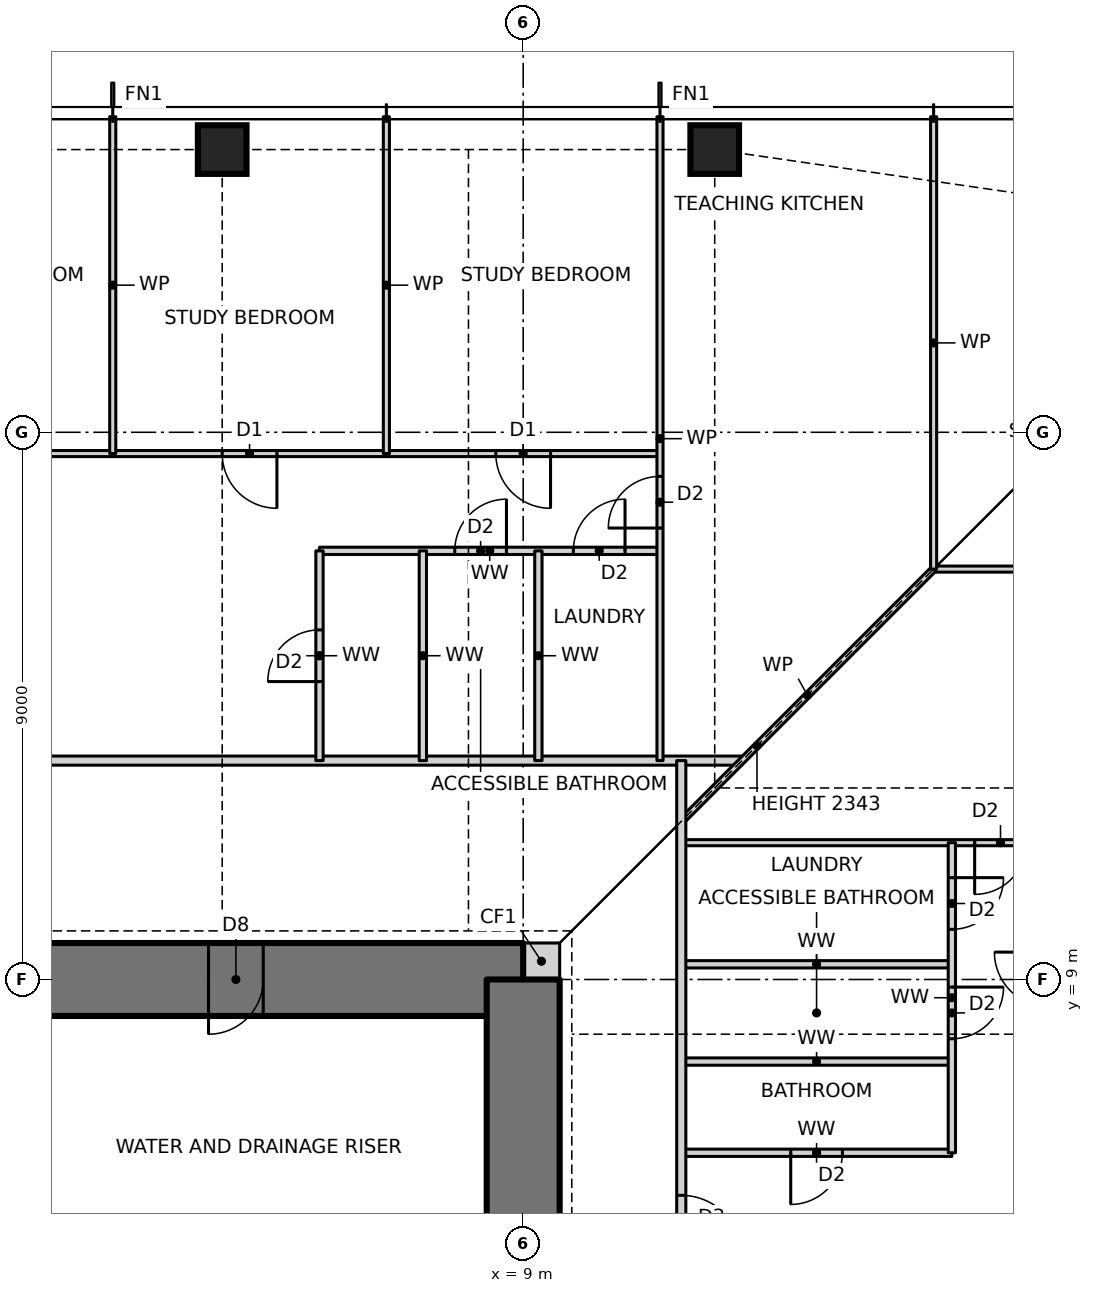
"""IFC4 building model, lengths in metres.
Left out: names, types, materials, properties, quantities, classifications, styles, units other than length and angle.
Written with IfcOpenShell. Run it as: python <this file> out.ifc"""

import sys

from ifc_helpers import new_model, si_unit, direction, frame, frame_2d, origin, origin_2d, place, context, subcontext, project, spatial, rectangle, hollow_rectangle, extrude, element, fill, save


model = new_model("IFC4")
c1 = context("Model", 3, precision=1e-05, world=origin(), true_north=direction((0.0, 1.0)))
c2 = subcontext(c1, "Body", "Model", "MODEL_VIEW")
j1 = project(units=[si_unit("LENGTHUNIT", "METRE"), si_unit("PLANEANGLEUNIT", "RADIAN")], contexts=[c1])
p1 = place(None, origin())
s1 = spatial("IfcSite", under=j1, at=p1, CompositionType="ELEMENT")
p2 = place(p1, origin())
s2 = spatial("IfcBuilding", under=s1, at=p2, CompositionType="ELEMENT")
p3 = place(p2, frame((0.0, 0.0, 60.5)))
s3 = spatial("IfcBuildingStorey", under=s2, at=p3, CompositionType="ELEMENT", Elevation=60.5)
for number, where, z_axis, x_axis in (
    (1, (12.15, 22.65, 0.0), (0.0, 0.0, 1.0), (1.0, 0.0, 0.0)),
    (2, (4.05, 22.65, 0.0), (0.0, 0.0, 1.0), (1.0, 0.0, 0.0)),
):
    element("IfcColumn", number, at=place(p3, frame(where, z_axis=z_axis, x_axis=x_axis)), inside=s3, PredefinedType="COLUMN", context=c2, shape_type="SweptSolid", body=[
        extrude(hollow_rectangle(XDim=0.8, YDim=0.8, WallThickness=0.09, at=origin_2d()), origin(), (0.0, 0.0, 1.0), 3.5),
    ])
p4 = place(p3, frame((9.0, 9.3, 0.0), z_axis=(0.0, 0.0, 1.0), x_axis=(1.0, 0.0, 0.0)))
e3 = element("IfcWall", 3, at=p4, inside=s3, PredefinedType="SOLIDWALL", context=c2, shape_type="SweptSolid", body=[
    extrude(rectangle(XDim=0.6, YDim=0.6, at=frame_2d((0.3, 0.0))), origin(), (0.0, 0.0, 1.0), 3.5),
])
p5 = place(p3, frame((9.0, 9.0, 0.0), z_axis=(0.0, 0.0, 1.0), x_axis=(-1.0, 0.0, 0.0)))
e4 = element("IfcWall", 4, at=p5, inside=s3, PredefinedType="SHEAR", context=c2, shape_type="SweptSolid", body=[
    extrude(rectangle(XDim=18.0, YDim=1.2, at=frame_2d((9.0, 0.0))), origin(), (0.0, 0.0, 1.0), 3.5),
])
p6 = place(p5, frame((11.125, 0.0, 0.0)))
e5 = element("IfcOpeningElement", 5, at=p6, cuts=e4, PredefinedType="OPENING", context=c2, shape_type="SweptSolid", body=[
    extrude(rectangle(XDim=0.9, YDim=2.1, at=frame_2d((0.45, 1.05))), frame((0.0, 0.61, 0.0), z_axis=(0.0, -1.0, 0.0), x_axis=(1.0, 0.0, 0.0)), (0.0, 0.0, 1.0), 1.22),
])
p7 = place(p5, frame((4.275, 0.0, 0.0)))
e6 = element("IfcOpeningElement", 6, at=p7, cuts=e4, PredefinedType="OPENING", context=c2, shape_type="SweptSolid", body=[
    extrude(rectangle(XDim=0.9, YDim=2.1, at=frame_2d((0.45, 1.05))), frame((0.0, 0.61, 0.0), z_axis=(0.0, -1.0, 0.0), x_axis=(1.0, 0.0, 0.0)), (0.0, 0.0, 1.0), 1.22),
])
p8 = place(p3, frame((9.0, -9.0, 0.0), z_axis=(0.0, 0.0, 1.0), x_axis=(0.0, 1.0, 0.0)))
e7 = element("IfcWall", 7, at=p8, inside=s3, PredefinedType="SHEAR", context=c2, shape_type="SweptSolid", body=[
    extrude(rectangle(XDim=18.0, YDim=1.2, at=frame_2d((9.0, 0.0))), origin(), (0.0, 0.0, 1.0), 3.5),
])
p9 = place(p8, frame((8.5, 0.0, 0.0)))
e8 = element("IfcOpeningElement", 8, at=p9, cuts=e7, PredefinedType="OPENING", context=c2, shape_type="SweptSolid", body=[
    extrude(rectangle(XDim=1.0, YDim=2.1, at=frame_2d((0.5, 1.05))), frame((0.0, 0.61, 0.0), z_axis=(0.0, -1.0, 0.0), x_axis=(1.0, 0.0, 0.0)), (0.0, 0.0, 1.0), 1.22),
])
p10 = place(p3, frame((11.6, 6.15, 0.0), z_axis=(0.0, 0.0, 1.0), x_axis=(1.0, 0.0, 0.0)))
e9 = element("IfcWall", 9, at=p10, inside=s3, PredefinedType="PARTITIONING", context=c2, shape_type="SweptSolid", body=[
    extrude(rectangle(XDim=4.45, YDim=0.12, at=frame_2d((2.225, 0.0))), origin(), (0.0, 0.0, 1.0), 3.27),
])
p11 = place(p10, frame((1.8, 0.0, 0.0)))
e10 = element("IfcOpeningElement", 10, at=p11, cuts=e9, PredefinedType="OPENING", context=c2, shape_type="SweptSolid", body=[
    extrude(rectangle(XDim=0.85, YDim=2.1, at=frame_2d((0.425, 1.05))), frame((0.0, 0.07, 0.0), z_axis=(0.0, -1.0, 0.0), x_axis=(1.0, 0.0, 0.0)), (0.0, 0.0, 1.0), 0.14),
])
for number, where, z_axis, x_axis in (
    (11, (11.6, 7.65, 0.0), (0.0, 0.0, 1.0), (1.0, 0.0, 0.0)),
    (12, (11.6, 9.25, 0.0), (0.0, 0.0, 1.0), (1.0, 0.0, 0.0)),
):
    element("IfcWall", number, at=place(p3, frame(where, z_axis=z_axis, x_axis=x_axis)), inside=s3, PredefinedType="PARTITIONING", context=c2, shape_type="SweptSolid", body=[
        extrude(rectangle(XDim=4.45, YDim=0.12, at=frame_2d((2.225, 0.0))), origin(), (0.0, 0.0, 1.0), 3.27),
    ])
p12 = place(p3, frame((11.6, 11.25, 0.0), z_axis=(0.0, 0.0, 1.0), x_axis=(1.0, 0.0, 0.0)))
e13 = element("IfcWall", 13, at=p12, inside=s3, PredefinedType="PARTITIONING", context=c2, shape_type="SweptSolid", body=[
    extrude(rectangle(XDim=11.59, YDim=0.1, at=frame_2d((5.795, 0.0))), origin(), (0.0, 0.0, 1.0), 3.27),
])
p13 = place(p12, frame((4.825, 0.0, 0.0)))
e14 = element("IfcOpeningElement", 14, at=p13, cuts=e13, PredefinedType="OPENING", context=c2, shape_type="SweptSolid", body=[
    extrude(rectangle(XDim=0.85, YDim=2.1, at=frame_2d((0.425, 1.05))), frame((0.0, 0.06, 0.0), z_axis=(0.0, -1.0, 0.0), x_axis=(1.0, 0.0, 0.0)), (0.0, 0.0, 1.0), 0.12),
])
p14 = place(p3, frame((-12.6, 12.6, 0.0), z_axis=(0.0, 0.0, 1.0), x_axis=(1.0, 0.0, 0.0)))
e15 = element("IfcWall", 15, at=p14, inside=s3, PredefinedType="PARTITIONING", context=c2, shape_type="SweptSolid", body=[
    extrude(rectangle(XDim=25.2, YDim=0.15, at=frame_2d((12.6, 0.0))), origin(), (0.0, 0.0, 1.0), 3.27),
])
p15 = place(p14, frame((11.505, 0.0, 0.0)))
e16 = element("IfcOpeningElement", 16, at=p15, cuts=e15, PredefinedType="OPENING", context=c2, shape_type="SweptSolid", body=[
    extrude(rectangle(XDim=1.0, YDim=2.1, at=frame_2d((0.5, 1.05))), frame((0.0, 0.085, 0.0), z_axis=(0.0, -1.0, 0.0), x_axis=(1.0, 0.0, 0.0)), (0.0, 0.0, 1.0), 0.17),
])
p16 = place(p3, frame((15.75, 15.75, 0.0), z_axis=(0.0, 0.0, 1.0), x_axis=(1.0, 0.0, 0.0)))
e17 = element("IfcWall", 17, at=p16, inside=s3, PredefinedType="PARTITIONING", context=c2, shape_type="SweptSolid", body=[
    extrude(rectangle(XDim=7.44, YDim=0.1, at=frame_2d((3.72, 0.0))), origin(), (0.0, 0.0, 1.0), 3.27),
])
p17 = place(p16, frame((3.295, 0.0, 0.0)))
e18 = element("IfcOpeningElement", 18, at=p17, cuts=e17, PredefinedType="OPENING", context=c2, shape_type="SweptSolid", body=[
    extrude(rectangle(XDim=0.85, YDim=2.1, at=frame_2d((0.425, 1.05))), frame((0.0, 0.06, 0.0), z_axis=(0.0, -1.0, 0.0), x_axis=(1.0, 0.0, 0.0)), (0.0, 0.0, 1.0), 0.12),
])
p18 = place(p3, frame((5.65, 16.05, 0.0), z_axis=(0.0, 0.0, 1.0), x_axis=(1.0, 0.0, 0.0)))
e19 = element("IfcWall", 19, at=p18, inside=s3, PredefinedType="PARTITIONING", context=c2, shape_type="SweptSolid", body=[
    extrude(rectangle(XDim=5.6, YDim=0.12, at=frame_2d((2.8, 0.0))), origin(), (0.0, 0.0, 1.0), 3.27),
])
p19 = place(p18, frame((4.175, 0.0, 0.0)))
e20 = element("IfcOpeningElement", 20, at=p19, cuts=e19, PredefinedType="OPENING", context=c2, shape_type="SweptSolid", body=[
    extrude(rectangle(XDim=0.85, YDim=2.1, at=frame_2d((0.425, 1.05))), frame((0.0, 0.07, 0.0), z_axis=(0.0, -1.0, 0.0), x_axis=(1.0, 0.0, 0.0)), (0.0, 0.0, 1.0), 0.14),
])
p20 = place(p18, frame((2.225, 0.0, 0.0)))
e21 = element("IfcOpeningElement", 21, at=p20, cuts=e19, PredefinedType="OPENING", context=c2, shape_type="SweptSolid", body=[
    extrude(rectangle(XDim=0.85, YDim=2.1, at=frame_2d((0.425, 1.05))), frame((0.0, 0.07, 0.0), z_axis=(0.0, -1.0, 0.0), x_axis=(1.0, 0.0, 0.0)), (0.0, 0.0, 1.0), 0.14),
])
p21 = place(p3, frame((-15.75, 17.65, 0.0), z_axis=(0.0, 0.0, 1.0), x_axis=(1.0, 0.0, 0.0)))
e22 = element("IfcWall", 22, at=p21, inside=s3, PredefinedType="PARTITIONING", context=c2, shape_type="SweptSolid", body=[
    extrude(rectangle(XDim=27.0, YDim=0.1, at=frame_2d((13.5, 0.0))), origin(), (0.0, 0.0, 1.0), 3.27),
])
p22 = place(p21, frame((24.3, 0.0, 0.0)))
e23 = element("IfcOpeningElement", 23, at=p22, cuts=e22, PredefinedType="OPENING", context=c2, shape_type="SweptSolid", body=[
    extrude(rectangle(XDim=0.9, YDim=2.1, at=frame_2d((0.45, 1.05))), frame((0.0, 0.06, 0.0), z_axis=(0.0, -1.0, 0.0), x_axis=(1.0, 0.0, 0.0)), (0.0, 0.0, 1.0), 0.12),
])
p23 = place(p21, frame((19.8, 0.0, 0.0)))
e24 = element("IfcOpeningElement", 24, at=p23, cuts=e22, PredefinedType="OPENING", context=c2, shape_type="SweptSolid", body=[
    extrude(rectangle(XDim=0.9, YDim=2.1, at=frame_2d((0.45, 1.05))), frame((0.0, 0.06, 0.0), z_axis=(0.0, -1.0, 0.0), x_axis=(1.0, 0.0, 0.0)), (0.0, 0.0, 1.0), 0.12),
])
p24 = place(p21, frame((15.3, 0.0, 0.0)))
e25 = element("IfcOpeningElement", 25, at=p24, cuts=e22, PredefinedType="OPENING", context=c2, shape_type="SweptSolid", body=[
    extrude(rectangle(XDim=0.9, YDim=2.1, at=frame_2d((0.45, 1.05))), frame((0.0, 0.06, 0.0), z_axis=(0.0, -1.0, 0.0), x_axis=(1.0, 0.0, 0.0)), (0.0, 0.0, 1.0), 0.12),
])
p25 = place(p21, frame((10.8, 0.0, 0.0)))
e26 = element("IfcOpeningElement", 26, at=p25, cuts=e22, PredefinedType="OPENING", context=c2, shape_type="SweptSolid", body=[
    extrude(rectangle(XDim=0.9, YDim=2.1, at=frame_2d((0.45, 1.05))), frame((0.0, 0.06, 0.0), z_axis=(0.0, -1.0, 0.0), x_axis=(1.0, 0.0, 0.0)), (0.0, 0.0, 1.0), 0.12),
])
p26 = place(p21, frame((6.3, 0.0, 0.0)))
e27 = element("IfcOpeningElement", 27, at=p26, cuts=e22, PredefinedType="OPENING", context=c2, shape_type="SweptSolid", body=[
    extrude(rectangle(XDim=0.9, YDim=2.1, at=frame_2d((0.45, 1.05))), frame((0.0, 0.06, 0.0), z_axis=(0.0, -1.0, 0.0), x_axis=(1.0, 0.0, 0.0)), (0.0, 0.0, 1.0), 0.12),
])
p27 = place(p21, frame((1.8, 0.0, 0.0)))
e28 = element("IfcOpeningElement", 28, at=p27, cuts=e22, PredefinedType="OPENING", context=c2, shape_type="SweptSolid", body=[
    extrude(rectangle(XDim=0.9, YDim=2.1, at=frame_2d((0.45, 1.05))), frame((0.0, 0.06, 0.0), z_axis=(0.0, -1.0, 0.0), x_axis=(1.0, 0.0, 0.0)), (0.0, 0.0, 1.0), 0.12),
])
p28 = place(p3, frame((11.6, 11.6, 0.0), z_axis=(0.0, 0.0, 1.0), x_axis=(0.707106781187, 0.707106781187, 0.0)))
e29 = element("IfcWall", 29, at=p28, inside=s3, PredefinedType="PARTITIONING", context=c2, shape_type="SweptSolid", body=[
    extrude(rectangle(XDim=5.869, YDim=0.1, at=frame_2d((2.935, 0.0))), origin(), (0.0, 0.0, 1.0), 2.343),
])
p29 = place(p3, frame((16.05, 6.15, 0.0), z_axis=(0.0, 0.0, 1.0), x_axis=(0.0, 1.0, 0.0)))
e30 = element("IfcWall", 30, at=p29, inside=s3, PredefinedType="PARTITIONING", context=c2, shape_type="SweptSolid", body=[
    extrude(rectangle(XDim=5.1, YDim=0.12, at=frame_2d((2.55, 0.0))), origin(), (0.0, 0.0, 1.0), 3.27),
])
p30 = place(p29, frame((1.875, 0.0, 0.0)))
e31 = element("IfcOpeningElement", 31, at=p30, cuts=e30, PredefinedType="OPENING", context=c2, shape_type="SweptSolid", body=[
    extrude(rectangle(XDim=0.85, YDim=2.1, at=frame_2d((0.425, 1.05))), frame((0.0, 0.07, 0.0), z_axis=(0.0, -1.0, 0.0), x_axis=(1.0, 0.0, 0.0)), (0.0, 0.0, 1.0), 0.14),
])
p31 = place(p29, frame((3.675, 0.0, 0.0)))
e32 = element("IfcOpeningElement", 32, at=p31, cuts=e30, PredefinedType="OPENING", context=c2, shape_type="SweptSolid", body=[
    extrude(rectangle(XDim=0.85, YDim=2.1, at=frame_2d((0.425, 1.05))), frame((0.0, 0.07, 0.0), z_axis=(0.0, -1.0, 0.0), x_axis=(1.0, 0.0, 0.0)), (0.0, 0.0, 1.0), 0.14),
])
p32 = place(p3, frame((15.75, 15.75, 0.0), z_axis=(0.0, 0.0, 1.0), x_axis=(0.0, 1.0, 0.0)))
e33 = element("IfcWall", 33, at=p32, inside=s3, PredefinedType="PARTITIONING", context=c2, shape_type="SweptSolid", body=[
    extrude(rectangle(XDim=7.44, YDim=0.1, at=frame_2d((3.72, 0.0))), origin(), (0.0, 0.0, 1.0), 3.27),
])
p33 = place(p3, frame((11.6, -11.6, 0.0), z_axis=(0.0, 0.0, 1.0), x_axis=(0.0, 1.0, 0.0)))
e34 = element("IfcWall", 34, at=p33, inside=s3, PredefinedType="PARTITIONING", context=c2, shape_type="SweptSolid", body=[
    extrude(rectangle(XDim=24.2, YDim=0.15, at=frame_2d((12.1, 0.0))), origin(), (0.0, 0.0, 1.0), 3.27),
])
p34 = place(p33, frame((16.05, 0.0, 0.0)))
e35 = element("IfcOpeningElement", 35, at=p34, cuts=e34, PredefinedType="OPENING", context=c2, shape_type="SweptSolid", body=[
    extrude(rectangle(XDim=1.0, YDim=2.1, at=frame_2d((0.5, 1.05))), frame((0.0, 0.085, 0.0), z_axis=(0.0, -1.0, 0.0), x_axis=(1.0, 0.0, 0.0)), (0.0, 0.0, 1.0), 0.17),
])
p35 = place(p3, frame((11.25, 12.6, 0.0), z_axis=(0.0, 0.0, 1.0), x_axis=(0.0, 1.0, 0.0)))
e36 = element("IfcWall", 36, at=p35, inside=s3, PredefinedType="PARTITIONING", context=c2, shape_type="SweptSolid", body=[
    extrude(rectangle(XDim=10.59, YDim=0.1, at=frame_2d((5.295, 0.0))), origin(), (0.0, 0.0, 1.0), 3.27),
])
p36 = place(p35, frame((3.825, 0.0, 0.0)))
e37 = element("IfcOpeningElement", 37, at=p36, cuts=e36, PredefinedType="OPENING", context=c2, shape_type="SweptSolid", body=[
    extrude(rectangle(XDim=0.85, YDim=2.1, at=frame_2d((0.425, 1.05))), frame((0.0, 0.06, 0.0), z_axis=(0.0, -1.0, 0.0), x_axis=(1.0, 0.0, 0.0)), (0.0, 0.0, 1.0), 0.12),
])
for number, where, z_axis, x_axis in (
    (38, (9.25, 12.6, 0.0), (0.0, 0.0, 1.0), (0.0, 1.0, 0.0)),
    (39, (7.35, 12.6, 0.0), (0.0, 0.0, 1.0), (0.0, 1.0, 0.0)),
):
    element("IfcWall", number, at=place(p3, frame(where, z_axis=z_axis, x_axis=x_axis)), inside=s3, PredefinedType="PARTITIONING", context=c2, shape_type="SweptSolid", body=[
        extrude(rectangle(XDim=3.45, YDim=0.12, at=frame_2d((1.725, 0.0))), origin(), (0.0, 0.0, 1.0), 3.27),
    ])
p37 = place(p3, frame((6.75, 17.65, 0.0), z_axis=(0.0, 0.0, 1.0), x_axis=(0.0, 1.0, 0.0)))
e40 = element("IfcWall", 40, at=p37, inside=s3, PredefinedType="PARTITIONING", context=c2, shape_type="SweptSolid", body=[
    extrude(rectangle(XDim=5.54, YDim=0.1, at=frame_2d((2.77, 0.0))), origin(), (0.0, 0.0, 1.0), 3.27),
])
p38 = place(p3, frame((5.65, 12.6, 0.0), z_axis=(0.0, 0.0, 1.0), x_axis=(0.0, 1.0, 0.0)))
e41 = element("IfcWall", 41, at=p38, inside=s3, PredefinedType="PARTITIONING", context=c2, shape_type="SweptSolid", body=[
    extrude(rectangle(XDim=3.45, YDim=0.12, at=frame_2d((1.725, 0.0))), origin(), (0.0, 0.0, 1.0), 3.27),
])
p39 = place(p38, frame((1.3, 0.0, 0.0)))
e42 = element("IfcOpeningElement", 42, at=p39, cuts=e41, PredefinedType="OPENING", context=c2, shape_type="SweptSolid", body=[
    extrude(rectangle(XDim=0.85, YDim=2.1, at=frame_2d((0.425, 1.05))), frame((0.0, 0.07, 0.0), z_axis=(0.0, -1.0, 0.0), x_axis=(1.0, 0.0, 0.0)), (0.0, 0.0, 1.0), 0.14),
])
p40 = place(p3, frame((2.25, 17.65, 0.0), z_axis=(0.0, 0.0, 1.0), x_axis=(0.0, 1.0, 0.0)))
e43 = element("IfcWall", 43, at=p40, inside=s3, PredefinedType="PARTITIONING", context=c2, shape_type="SweptSolid", body=[
    extrude(rectangle(XDim=5.54, YDim=0.1, at=frame_2d((2.77, 0.0))), origin(), (0.0, 0.0, 1.0), 3.27),
])
p41 = place(p34, frame((1.0, 0.0, 0.0), z_axis=(0.0, 0.0, 1.0), x_axis=(-1.0, 0.0, 0.0)))
e44 = element("IfcDoor", 44, at=p41, inside=s3, OperationType="SINGLE_SWING_RIGHT", PredefinedType="DOOR", context=c2, shape_type="SweptSolid", body=[
    extrude(rectangle(XDim=1.0, YDim=2.1, at=frame_2d((0.5, 1.05))), frame((0.0, 0.025, 0.0), z_axis=(0.0, -1.0, 0.0), x_axis=(1.0, 0.0, 0.0)), (0.0, 0.0, 1.0), 0.05),
])
fill(e35, e44)
p42 = place(p11, frame((0.85, 0.0, 0.0), z_axis=(0.0, 0.0, 1.0), x_axis=(-1.0, 0.0, 0.0)))
e45 = element("IfcDoor", 45, at=p42, inside=s3, OperationType="SINGLE_SWING_RIGHT", PredefinedType="DOOR", context=c2, shape_type="SweptSolid", body=[
    extrude(rectangle(XDim=0.85, YDim=2.1, at=frame_2d((0.425, 1.05))), frame((0.0, 0.025, 0.0), z_axis=(0.0, -1.0, 0.0), x_axis=(1.0, 0.0, 0.0)), (0.0, 0.0, 1.0), 0.05),
])
fill(e10, e45)
p43 = place(p30, frame((0.85, 0.0, 0.0), z_axis=(0.0, 0.0, 1.0), x_axis=(-1.0, 0.0, 0.0)))
e46 = element("IfcDoor", 46, at=p43, inside=s3, OperationType="SINGLE_SWING_LEFT", PredefinedType="DOOR", context=c2, shape_type="SweptSolid", body=[
    extrude(rectangle(XDim=0.85, YDim=2.1, at=frame_2d((0.425, 1.05))), frame((0.0, 0.025, 0.0), z_axis=(0.0, -1.0, 0.0), x_axis=(1.0, 0.0, 0.0)), (0.0, 0.0, 1.0), 0.05),
])
fill(e31, e46)
p44 = place(p31, frame((0.85, 0.0, 0.0), z_axis=(0.0, 0.0, 1.0), x_axis=(-1.0, 0.0, 0.0)))
e47 = element("IfcDoor", 47, at=p44, inside=s3, OperationType="SINGLE_SWING_LEFT", PredefinedType="DOOR", context=c2, shape_type="SweptSolid", body=[
    extrude(rectangle(XDim=0.85, YDim=2.1, at=frame_2d((0.425, 1.05))), frame((0.0, 0.025, 0.0), z_axis=(0.0, -1.0, 0.0), x_axis=(1.0, 0.0, 0.0)), (0.0, 0.0, 1.0), 0.05),
])
fill(e32, e47)
p45 = place(p13, frame((0.85, 0.0, 0.0), z_axis=(0.0, 0.0, 1.0), x_axis=(-1.0, 0.0, 0.0)))
e48 = element("IfcDoor", 48, at=p45, inside=s3, OperationType="SINGLE_SWING_RIGHT", PredefinedType="DOOR", context=c2, shape_type="SweptSolid", body=[
    extrude(rectangle(XDim=0.85, YDim=2.1, at=frame_2d((0.425, 1.05))), frame((0.0, 0.025, 0.0), z_axis=(0.0, -1.0, 0.0), x_axis=(1.0, 0.0, 0.0)), (0.0, 0.0, 1.0), 0.05),
])
fill(e14, e48)
p46 = place(p36, origin())
e49 = element("IfcDoor", 49, at=p46, inside=s3, OperationType="SINGLE_SWING_LEFT", PredefinedType="DOOR", context=c2, shape_type="SweptSolid", body=[
    extrude(rectangle(XDim=0.85, YDim=2.1, at=frame_2d((0.425, 1.05))), frame((0.0, 0.025, 0.0), z_axis=(0.0, -1.0, 0.0), x_axis=(1.0, 0.0, 0.0)), (0.0, 0.0, 1.0), 0.05),
])
fill(e37, e49)
p47 = place(p22, frame((0.9, 0.0, 0.0), z_axis=(0.0, 0.0, 1.0), x_axis=(-1.0, 0.0, 0.0)))
e50 = element("IfcDoor", 50, at=p47, inside=s3, OperationType="SINGLE_SWING_LEFT", PredefinedType="DOOR", context=c2, shape_type="SweptSolid", body=[
    extrude(rectangle(XDim=0.9, YDim=2.1, at=frame_2d((0.45, 1.05))), frame((0.0, 0.025, 0.0), z_axis=(0.0, -1.0, 0.0), x_axis=(1.0, 0.0, 0.0)), (0.0, 0.0, 1.0), 0.05),
])
fill(e23, e50)
p48 = place(p23, frame((0.9, 0.0, 0.0), z_axis=(0.0, 0.0, 1.0), x_axis=(-1.0, 0.0, 0.0)))
e51 = element("IfcDoor", 51, at=p48, inside=s3, OperationType="SINGLE_SWING_LEFT", PredefinedType="DOOR", context=c2, shape_type="SweptSolid", body=[
    extrude(rectangle(XDim=0.9, YDim=2.1, at=frame_2d((0.45, 1.05))), frame((0.0, 0.025, 0.0), z_axis=(0.0, -1.0, 0.0), x_axis=(1.0, 0.0, 0.0)), (0.0, 0.0, 1.0), 0.05),
])
fill(e24, e51)
p49 = place(p19, origin())
e52 = element("IfcDoor", 52, at=p49, inside=s3, OperationType="SINGLE_SWING_RIGHT", PredefinedType="DOOR", context=c2, shape_type="SweptSolid", body=[
    extrude(rectangle(XDim=0.85, YDim=2.1, at=frame_2d((0.425, 1.05))), frame((0.0, 0.025, 0.0), z_axis=(0.0, -1.0, 0.0), x_axis=(1.0, 0.0, 0.0)), (0.0, 0.0, 1.0), 0.05),
])
fill(e20, e52)
p50 = place(p20, origin())
e53 = element("IfcDoor", 53, at=p50, inside=s3, OperationType="SINGLE_SWING_RIGHT", PredefinedType="DOOR", context=c2, shape_type="SweptSolid", body=[
    extrude(rectangle(XDim=0.85, YDim=2.1, at=frame_2d((0.425, 1.05))), frame((0.0, 0.025, 0.0), z_axis=(0.0, -1.0, 0.0), x_axis=(1.0, 0.0, 0.0)), (0.0, 0.0, 1.0), 0.05),
])
fill(e21, e53)
p51 = place(p39, origin())
e54 = element("IfcDoor", 54, at=p51, inside=s3, OperationType="SINGLE_SWING_LEFT", PredefinedType="DOOR", context=c2, shape_type="SweptSolid", body=[
    extrude(rectangle(XDim=0.85, YDim=2.1, at=frame_2d((0.425, 1.05))), frame((0.0, 0.025, 0.0), z_axis=(0.0, -1.0, 0.0), x_axis=(1.0, 0.0, 0.0)), (0.0, 0.0, 1.0), 0.05),
])
fill(e42, e54)
p52 = place(p7, origin())
e55 = element("IfcDoor", 55, at=p52, inside=s3, OperationType="SINGLE_SWING_RIGHT", PredefinedType="DOOR", context=c2, shape_type="SweptSolid", body=[
    extrude(rectangle(XDim=0.9, YDim=2.1, at=frame_2d((0.45, 1.05))), frame((0.0, 0.025, 0.0), z_axis=(0.0, -1.0, 0.0), x_axis=(1.0, 0.0, 0.0)), (0.0, 0.0, 1.0), 0.05),
])
fill(e6, e55)
save(model, sys.argv[1])
